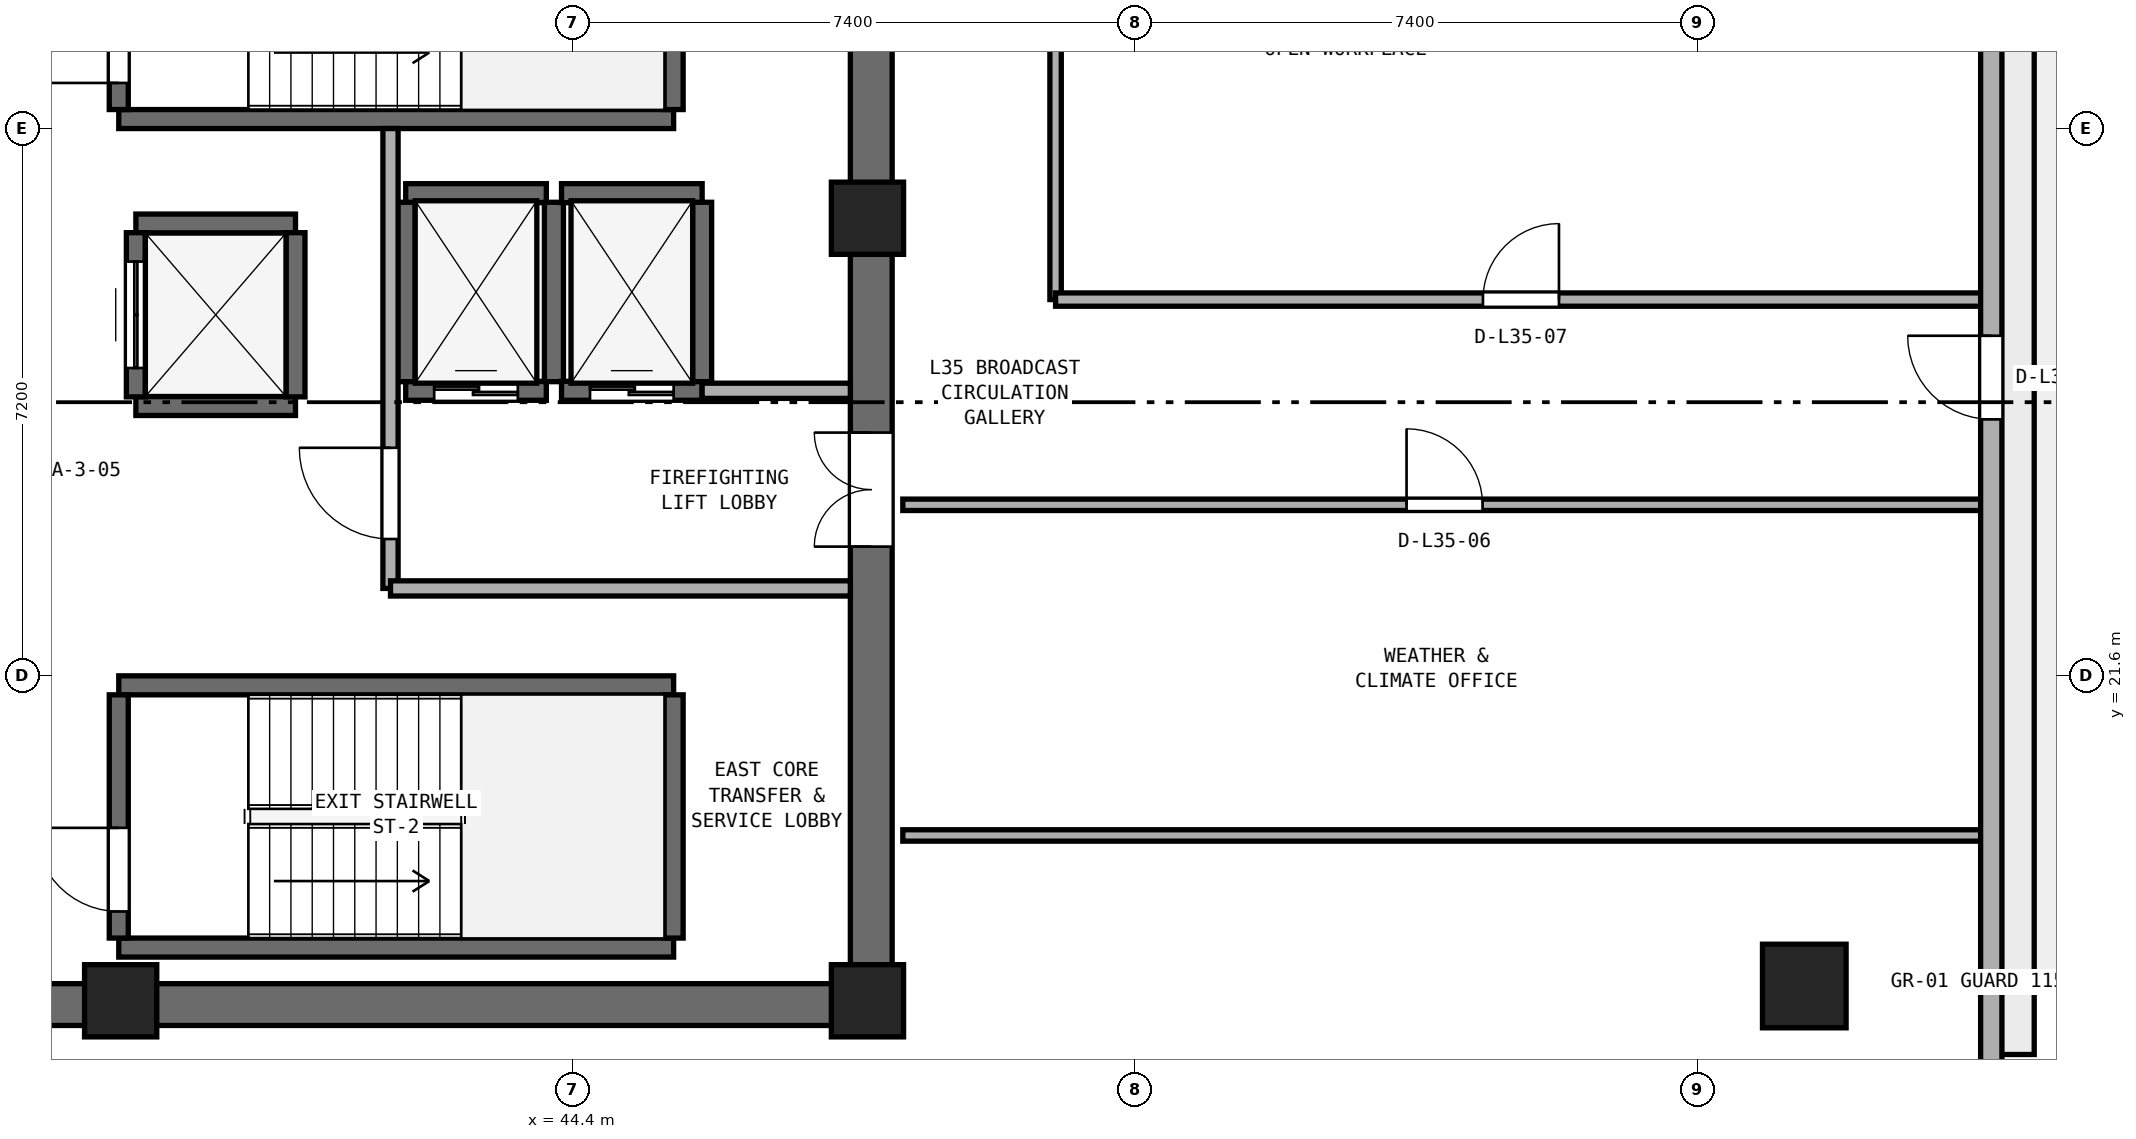
"""IFC4 building model, lengths in metres.
Left out: names, types, materials, properties, quantities, classifications, styles, units other than length and angle.
Written with IfcOpenShell. Run it as: python <this file> out.ifc"""

import sys

from ifc_helpers import new_model, si_unit, direction, frame, frame_2d, origin, origin_2d, place, context, subcontext, project, spatial, rectangle, extrude, element, fill, save


model = new_model("IFC4")
c1 = context("Model", 3, precision=1e-05, world=origin(), true_north=direction((0.0, 1.0)))
c2 = subcontext(c1, "Body", "Model", "MODEL_VIEW")
j1 = project(units=[si_unit("LENGTHUNIT", "METRE"), si_unit("PLANEANGLEUNIT", "RADIAN")], contexts=[c1])
p1 = place(None, origin())
s1 = spatial("IfcSite", under=j1, at=p1, CompositionType="ELEMENT")
p2 = place(p1, origin())
s2 = spatial("IfcBuilding", under=s1, at=p2, CompositionType="ELEMENT")
p3 = place(p2, frame((0.0, 0.0, 140.2)))
s3 = spatial("IfcBuildingStorey", under=s2, at=p3, CompositionType="ELEMENT", Elevation=140.2)
p4 = place(p3, frame((25.4, 17.275, 0.0), z_axis=(0.0, 0.0, 1.0), x_axis=(1.0, 0.0, 0.0)))
e1 = element("IfcWall", 1, at=p4, inside=s3, PredefinedType="SHEAR", context=c2, shape_type="SweptSolid", body=[
    extrude(rectangle(XDim=23.2, YDim=0.55, at=frame_2d((11.6, 0.0))), origin(), (0.0, 0.0, 1.0), 3.54),
])
p5 = place(p3, frame((48.325, 17.55, 0.0), z_axis=(0.0, 0.0, 1.0), x_axis=(0.0, 1.0, 0.0)))
e2 = element("IfcWall", 2, at=p5, inside=s3, PredefinedType="SHEAR", context=c2, shape_type="SweptSolid", body=[
    extrude(rectangle(XDim=15.3, YDim=0.55, at=frame_2d((7.65, 0.0))), origin(), (0.0, 0.0, 1.0), 3.54),
])
p6 = place(p5, frame((5.75, 0.0, 0.0)))
e3 = element("IfcOpeningElement", 3, at=p6, cuts=e2, PredefinedType="OPENING", context=c2, shape_type="SweptSolid", body=[
    extrude(rectangle(XDim=1.5, YDim=2.15, at=frame_2d((0.75, 1.075))), frame((0.0, 0.285, 0.0), z_axis=(0.0, -1.0, 0.0), x_axis=(1.0, 0.0, 0.0)), (0.0, 0.0, 1.0), 0.57),
])
for number, where, z_axis, x_axis in (
    (4, (38.45, 17.325, 0.0), (0.0, 0.0, 1.0), (1.0, 0.0, 0.0)),
    (5, (48.275, 17.325, 0.0), (0.0, 0.0, 1.0), (1.0, 0.0, 0.0)),
    (6, (48.275, 27.62, 0.0), (0.0, 0.0, 1.0), (1.0, 0.0, 0.0)),
):
    element("IfcColumn", number, at=place(p3, frame(where, z_axis=z_axis, x_axis=x_axis)), inside=s3, PredefinedType="PILASTER", context=c2, shape_type="SweptSolid", body=[
        extrude(rectangle(XDim=0.95, YDim=0.95, at=origin_2d()), origin(), (0.0, 0.0, 1.0), 3.8),
    ])
p7 = place(p3, frame((60.6, 17.519, 0.0), z_axis=(0.0, 0.0, 1.0), x_axis=(1.0, 0.0, 0.0)))
e7 = element("IfcColumn", 7, at=p7, inside=s3, PredefinedType="COLUMN", context=c2, shape_type="SweptSolid", body=[
    extrude(rectangle(XDim=1.1, YDim=1.1, at=origin_2d()), origin(), (0.0, 0.0, 1.0), 3.8),
])
p8 = place(p3, frame((38.425, 28.925, 0.0), z_axis=(0.0, 0.0, 1.0), x_axis=(1.0, 0.0, 0.0)))
e8 = element("IfcWall", 8, at=p8, inside=s3, PredefinedType="SHEAR", context=c2, shape_type="SweptSolid", body=[
    extrude(rectangle(XDim=7.3, YDim=0.25, at=frame_2d((3.65, 0.0))), origin(), (0.0, 0.0, 1.0), 3.54),
])
p9 = place(p3, frame((38.425, 29.05, 0.0), z_axis=(0.0, 0.0, 1.0), x_axis=(0.0, 1.0, 0.0)))
e9 = element("IfcWall", 9, at=p9, inside=s3, PredefinedType="SHEAR", context=c2, shape_type="SweptSolid", body=[
    extrude(rectangle(XDim=3.2, YDim=0.25, at=frame_2d((1.6, 0.0))), origin(), (0.0, 0.0, 1.0), 3.54),
])
p10 = place(p9, frame((0.35, 0.0, 0.0)))
e10 = element("IfcOpeningElement", 10, at=p10, cuts=e9, PredefinedType="OPENING", context=c2, shape_type="SweptSolid", body=[
    extrude(rectangle(XDim=1.1, YDim=2.15, at=frame_2d((0.55, 1.075))), frame((0.0, 0.135, 0.0), z_axis=(0.0, -1.0, 0.0), x_axis=(1.0, 0.0, 0.0)), (0.0, 0.0, 1.0), 0.27),
])
p11 = place(p3, frame((45.725, 29.05, 0.0), z_axis=(0.0, 0.0, 1.0), x_axis=(0.0, 1.0, 0.0)))
e11 = element("IfcWall", 11, at=p11, inside=s3, PredefinedType="SHEAR", context=c2, shape_type="SweptSolid", body=[
    extrude(rectangle(XDim=3.2, YDim=0.25, at=frame_2d((1.6, 0.0))), origin(), (0.0, 0.0, 1.0), 3.54),
])
for number, where, z_axis, x_axis in (
    (12, (38.425, 18.025, 0.0), (0.0, 0.0, 1.0), (1.0, 0.0, 0.0)),
    (13, (38.425, 21.475, 0.0), (0.0, 0.0, 1.0), (1.0, 0.0, 0.0)),
):
    element("IfcWall", number, at=place(p3, frame(where, z_axis=z_axis, x_axis=x_axis)), inside=s3, PredefinedType="SHEAR", context=c2, shape_type="SweptSolid", body=[
        extrude(rectangle(XDim=7.3, YDim=0.25, at=frame_2d((3.65, 0.0))), origin(), (0.0, 0.0, 1.0), 3.54),
    ])
p12 = place(p3, frame((38.425, 18.15, 0.0), z_axis=(0.0, 0.0, 1.0), x_axis=(0.0, 1.0, 0.0)))
e14 = element("IfcWall", 14, at=p12, inside=s3, PredefinedType="SHEAR", context=c2, shape_type="SweptSolid", body=[
    extrude(rectangle(XDim=3.2, YDim=0.25, at=frame_2d((1.6, 0.0))), origin(), (0.0, 0.0, 1.0), 3.54),
])
p13 = place(p12, frame((0.35, 0.0, 0.0)))
e15 = element("IfcOpeningElement", 15, at=p13, cuts=e14, PredefinedType="OPENING", context=c2, shape_type="SweptSolid", body=[
    extrude(rectangle(XDim=1.1, YDim=2.15, at=frame_2d((0.55, 1.075))), frame((0.0, 0.135, 0.0), z_axis=(0.0, -1.0, 0.0), x_axis=(1.0, 0.0, 0.0)), (0.0, 0.0, 1.0), 0.27),
])
p14 = place(p3, frame((45.725, 18.15, 0.0), z_axis=(0.0, 0.0, 1.0), x_axis=(0.0, 1.0, 0.0)))
e16 = element("IfcWall", 16, at=p14, inside=s3, PredefinedType="SHEAR", context=c2, shape_type="SweptSolid", body=[
    extrude(rectangle(XDim=3.2, YDim=0.25, at=frame_2d((1.6, 0.0))), origin(), (0.0, 0.0, 1.0), 3.54),
])
p15 = place(p3, frame((42.2, 25.35, 0.0), z_axis=(0.0, 0.0, 1.0), x_axis=(1.0, 0.0, 0.0)))
e17 = element("IfcWall", 17, at=p15, inside=s3, PredefinedType="SHEAR", context=c2, shape_type="SweptSolid", body=[
    extrude(rectangle(XDim=1.85, YDim=0.25, at=frame_2d((0.925, 0.0))), origin(), (0.0, 0.0, 1.0), 3.54),
])
p16 = place(p15, frame((0.375, 0.0, 0.0)))
e18 = element("IfcOpeningElement", 18, at=p16, cuts=e17, PredefinedType="OPENING", context=c2, shape_type="SweptSolid", body=[
    extrude(rectangle(XDim=1.1, YDim=2.15, at=frame_2d((0.55, 1.075))), frame((0.0, 0.135, 0.0), z_axis=(0.0, -1.0, 0.0), x_axis=(1.0, 0.0, 0.0)), (0.0, 0.0, 1.0), 0.27),
])
p17 = place(p3, frame((42.2, 27.95, 0.0), z_axis=(0.0, 0.0, 1.0), x_axis=(1.0, 0.0, 0.0)))
e19 = element("IfcWall", 19, at=p17, inside=s3, PredefinedType="SHEAR", context=c2, shape_type="SweptSolid", body=[
    extrude(rectangle(XDim=1.85, YDim=0.25, at=frame_2d((0.925, 0.0))), origin(), (0.0, 0.0, 1.0), 3.54),
])
for number, where, z_axis, x_axis in (
    (20, (42.2, 25.47, 0.0), (0.0, 0.0, 1.0), (0.0, 1.0, 0.0)),
    (21, (44.15, 25.47, 0.0), (0.0, 0.0, 1.0), (0.0, 1.0, 0.0)),
):
    element("IfcWall", number, at=place(p3, frame(where, z_axis=z_axis, x_axis=x_axis)), inside=s3, PredefinedType="SHEAR", context=c2, shape_type="SweptSolid", body=[
        extrude(rectangle(XDim=2.36, YDim=0.25, at=frame_2d((1.18, 0.0))), origin(), (0.0, 0.0, 1.0), 3.54),
    ])
p18 = place(p3, frame((44.25, 25.35, 0.0), z_axis=(0.0, 0.0, 1.0), x_axis=(1.0, 0.0, 0.0)))
e22 = element("IfcWall", 22, at=p18, inside=s3, PredefinedType="SHEAR", context=c2, shape_type="SweptSolid", body=[
    extrude(rectangle(XDim=1.85, YDim=0.25, at=frame_2d((0.925, 0.0))), origin(), (0.0, 0.0, 1.0), 3.54),
])
p19 = place(p18, frame((0.375, 0.0, 0.0)))
e23 = element("IfcOpeningElement", 23, at=p19, cuts=e22, PredefinedType="OPENING", context=c2, shape_type="SweptSolid", body=[
    extrude(rectangle(XDim=1.1, YDim=2.15, at=frame_2d((0.55, 1.075))), frame((0.0, 0.135, 0.0), z_axis=(0.0, -1.0, 0.0), x_axis=(1.0, 0.0, 0.0)), (0.0, 0.0, 1.0), 0.27),
])
p20 = place(p3, frame((44.25, 27.95, 0.0), z_axis=(0.0, 0.0, 1.0), x_axis=(1.0, 0.0, 0.0)))
e24 = element("IfcWall", 24, at=p20, inside=s3, PredefinedType="SHEAR", context=c2, shape_type="SweptSolid", body=[
    extrude(rectangle(XDim=1.85, YDim=0.25, at=frame_2d((0.925, 0.0))), origin(), (0.0, 0.0, 1.0), 3.54),
])
p21 = place(p3, frame((46.1, 25.47, 0.0), z_axis=(0.0, 0.0, 1.0), x_axis=(0.0, 1.0, 0.0)))
e25 = element("IfcWall", 25, at=p21, inside=s3, PredefinedType="SHEAR", context=c2, shape_type="SweptSolid", body=[
    extrude(rectangle(XDim=2.36, YDim=0.25, at=frame_2d((1.18, 0.0))), origin(), (0.0, 0.0, 1.0), 3.54),
])
for number, where, z_axis, x_axis in (
    (26, (38.65, 25.15, 0.0), (0.0, 0.0, 1.0), (1.0, 0.0, 0.0)),
    (27, (38.65, 27.55, 0.0), (0.0, 0.0, 1.0), (1.0, 0.0, 0.0)),
):
    element("IfcWall", number, at=place(p3, frame(where, z_axis=z_axis, x_axis=x_axis)), inside=s3, PredefinedType="SHEAR", context=c2, shape_type="SweptSolid", body=[
        extrude(rectangle(XDim=2.1, YDim=0.25, at=frame_2d((1.05, 0.0))), origin(), (0.0, 0.0, 1.0), 3.54),
    ])
p22 = place(p3, frame((38.65, 25.27, 0.0), z_axis=(0.0, 0.0, 1.0), x_axis=(0.0, 1.0, 0.0)))
e28 = element("IfcWall", 28, at=p22, inside=s3, PredefinedType="SHEAR", context=c2, shape_type="SweptSolid", body=[
    extrude(rectangle(XDim=2.16, YDim=0.25, at=frame_2d((1.08, 0.0))), origin(), (0.0, 0.0, 1.0), 3.54),
])
p23 = place(p22, frame((0.38, 0.0, 0.0)))
e29 = element("IfcOpeningElement", 29, at=p23, cuts=e28, PredefinedType="OPENING", context=c2, shape_type="SweptSolid", body=[
    extrude(rectangle(XDim=1.4, YDim=2.2, at=frame_2d((0.7, 1.1))), frame((0.0, 0.135, 0.0), z_axis=(0.0, -1.0, 0.0), x_axis=(1.0, 0.0, 0.0)), (0.0, 0.0, 1.0), 0.27),
])
p24 = place(p3, frame((40.75, 25.27, 0.0), z_axis=(0.0, 0.0, 1.0), x_axis=(0.0, 1.0, 0.0)))
e30 = element("IfcWall", 30, at=p24, inside=s3, PredefinedType="SHEAR", context=c2, shape_type="SweptSolid", body=[
    extrude(rectangle(XDim=2.16, YDim=0.25, at=frame_2d((1.08, 0.0))), origin(), (0.0, 0.0, 1.0), 3.54),
])
p25 = place(p3, frame((42.0, 22.75, 0.0), z_axis=(0.0, 0.0, 1.0), x_axis=(0.0, 1.0, 0.0)))
e31 = element("IfcWall", 31, at=p25, inside=s3, PredefinedType="SOLIDWALL", context=c2, shape_type="SweptSolid", body=[
    extrude(rectangle(XDim=6.05, YDim=0.2, at=frame_2d((3.025, 0.0))), origin(), (0.0, 0.0, 1.0), 3.54),
])
p26 = place(p25, frame((0.65, 0.0, 0.0)))
e32 = element("IfcOpeningElement", 32, at=p26, cuts=e31, PredefinedType="OPENING", context=c2, shape_type="SweptSolid", body=[
    extrude(rectangle(XDim=1.2, YDim=2.15, at=frame_2d((0.6, 1.075))), frame((0.0, 0.11, 0.0), z_axis=(0.0, -1.0, 0.0), x_axis=(1.0, 0.0, 0.0)), (0.0, 0.0, 1.0), 0.22),
])
p27 = place(p3, frame((42.0, 22.75, 0.0), z_axis=(0.0, 0.0, 1.0), x_axis=(1.0, 0.0, 0.0)))
e33 = element("IfcWall", 33, at=p27, inside=s3, PredefinedType="SOLIDWALL", context=c2, shape_type="SweptSolid", body=[
    extrude(rectangle(XDim=6.05, YDim=0.2, at=frame_2d((3.025, 0.0))), origin(), (0.0, 0.0, 1.0), 3.54),
])
p28 = place(p3, frame((46.1, 25.35, 0.0), z_axis=(0.0, 0.0, 1.0), x_axis=(1.0, 0.0, 0.0)))
e34 = element("IfcWall", 34, at=p28, inside=s3, PredefinedType="SOLIDWALL", context=c2, shape_type="SweptSolid", body=[
    extrude(rectangle(XDim=1.95, YDim=0.2, at=frame_2d((0.975, 0.0))), origin(), (0.0, 0.0, 1.0), 3.54),
])
p29 = place(p3, frame((50.75, 26.55, 0.0), z_axis=(0.0, 0.0, 1.0), x_axis=(0.0, 1.0, 0.0)))
e35 = element("IfcWall", 35, at=p29, inside=s3, PredefinedType="PARTITIONING", context=c2, shape_type="SweptSolid", body=[
    extrude(rectangle(XDim=9.0, YDim=0.15, at=frame_2d((4.5, 0.0))), origin(), (0.0, 0.0, 1.0), 3.54),
])
p30 = place(p3, frame((48.74, 19.5, 0.0), z_axis=(0.0, 0.0, 1.0), x_axis=(1.0, 0.0, 0.0)))
e36 = element("IfcWall", 36, at=p30, inside=s3, PredefinedType="PARTITIONING", context=c2, shape_type="SweptSolid", body=[
    extrude(rectangle(XDim=14.255, YDim=0.15, at=frame_2d((7.127, 0.0))), origin(), (0.0, 0.0, 1.0), 3.54),
])
p31 = place(p3, frame((48.74, 23.85, 0.0), z_axis=(0.0, 0.0, 1.0), x_axis=(1.0, 0.0, 0.0)))
e37 = element("IfcWall", 37, at=p31, inside=s3, PredefinedType="PARTITIONING", context=c2, shape_type="SweptSolid", body=[
    extrude(rectangle(XDim=14.255, YDim=0.15, at=frame_2d((7.127, 0.0))), origin(), (0.0, 0.0, 1.0), 3.54),
])
p32 = place(p31, frame((6.627, 0.0, 0.0)))
e38 = element("IfcOpeningElement", 38, at=p32, cuts=e37, PredefinedType="OPENING", context=c2, shape_type="SweptSolid", body=[
    extrude(rectangle(XDim=1.0, YDim=2.12, at=frame_2d((0.5, 1.06))), frame((0.0, 0.085, 0.0), z_axis=(0.0, -1.0, 0.0), x_axis=(1.0, 0.0, 0.0)), (0.0, 0.0, 1.0), 0.17),
])
p33 = place(p3, frame((50.75, 26.55, 0.0), z_axis=(0.0, 0.0, 1.0), x_axis=(1.0, 0.0, 0.0)))
e39 = element("IfcWall", 39, at=p33, inside=s3, PredefinedType="PARTITIONING", context=c2, shape_type="SweptSolid", body=[
    extrude(rectangle(XDim=12.245, YDim=0.175, at=frame_2d((6.123, 0.0))), origin(), (0.0, 0.0, 1.0), 3.54),
])
p34 = place(p33, frame((5.623, 0.0, 0.0)))
e40 = element("IfcOpeningElement", 40, at=p34, cuts=e39, PredefinedType="OPENING", context=c2, shape_type="SweptSolid", body=[
    extrude(rectangle(XDim=1.0, YDim=2.12, at=frame_2d((0.5, 1.06))), frame((0.0, 0.097, 0.0), z_axis=(0.0, -1.0, 0.0), x_axis=(1.0, 0.0, 0.0)), (0.0, 0.0, 1.0), 0.195),
])
p35 = place(p3, frame((63.06, 16.418, 0.0), z_axis=(0.0, 0.0, 1.0), x_axis=(0.0, 1.0, 0.0)))
e41 = element("IfcWall", 41, at=p35, inside=s3, PredefinedType="STANDARD", context=c2, shape_type="SweptSolid", body=[
    extrude(rectangle(XDim=18.812, YDim=0.28, at=frame_2d((9.406, 0.0))), origin(), (0.0, 0.0, 1.0), 3.54),
])
p36 = place(p35, frame((8.556, 0.0, 0.0)))
e42 = element("IfcOpeningElement", 42, at=p36, cuts=e41, PredefinedType="OPENING", context=c2, shape_type="SweptSolid", body=[
    extrude(rectangle(XDim=1.1, YDim=2.2, at=frame_2d((0.55, 1.1))), frame((0.0, 0.15, 0.0), z_axis=(0.0, -1.0, 0.0), x_axis=(1.0, 0.0, 0.0)), (0.0, 0.0, 1.0), 0.3),
])
p37 = place(p35, frame((14.143, 0.0, 0.9)))
e43 = element("IfcOpeningElement", 43, at=p37, cuts=e41, PredefinedType="OPENING", context=c2, shape_type="SweptSolid", body=[
    extrude(rectangle(XDim=2.4, YDim=1.75, at=frame_2d((1.2, 0.875))), frame((0.0, 0.15, 0.0), z_axis=(0.0, -1.0, 0.0), x_axis=(1.0, 0.0, 0.0)), (0.0, 0.0, 1.0), 0.3),
])
p38 = place(p10, origin())
e44 = element("IfcDoor", 44, at=p38, inside=s3, OperationType="SINGLE_SWING_LEFT", PredefinedType="DOOR", context=c2, shape_type="SweptSolid", body=[
    extrude(rectangle(XDim=1.1, YDim=2.15, at=frame_2d((0.55, 1.075))), frame((0.0, 0.025, 0.0), z_axis=(0.0, -1.0, 0.0), x_axis=(1.0, 0.0, 0.0)), (0.0, 0.0, 1.0), 0.05),
])
fill(e10, e44)
p39 = place(p13, origin())
e45 = element("IfcDoor", 45, at=p39, inside=s3, OperationType="SINGLE_SWING_RIGHT", PredefinedType="DOOR", context=c2, shape_type="SweptSolid", body=[
    extrude(rectangle(XDim=1.1, YDim=2.15, at=frame_2d((0.55, 1.075))), frame((0.0, 0.025, 0.0), z_axis=(0.0, -1.0, 0.0), x_axis=(1.0, 0.0, 0.0)), (0.0, 0.0, 1.0), 0.05),
])
fill(e15, e45)
p40 = place(p16, origin())
e46 = element("IfcDoor", 46, at=p40, inside=s3, OperationType="DOUBLE_DOOR_SLIDING", PredefinedType="DOOR", context=c2, shape_type="SweptSolid", body=[
    extrude(rectangle(XDim=1.1, YDim=2.15, at=frame_2d((0.55, 1.075))), frame((0.0, 0.025, 0.0), z_axis=(0.0, -1.0, 0.0), x_axis=(1.0, 0.0, 0.0)), (0.0, 0.0, 1.0), 0.05),
])
fill(e18, e46)
p41 = place(p19, origin())
e47 = element("IfcDoor", 47, at=p41, inside=s3, OperationType="DOUBLE_DOOR_SLIDING", PredefinedType="DOOR", context=c2, shape_type="SweptSolid", body=[
    extrude(rectangle(XDim=1.1, YDim=2.15, at=frame_2d((0.55, 1.075))), frame((0.0, 0.025, 0.0), z_axis=(0.0, -1.0, 0.0), x_axis=(1.0, 0.0, 0.0)), (0.0, 0.0, 1.0), 0.05),
])
fill(e23, e47)
p42 = place(p23, origin())
e48 = element("IfcDoor", 48, at=p42, inside=s3, OperationType="DOUBLE_DOOR_SLIDING", PredefinedType="DOOR", context=c2, shape_type="SweptSolid", body=[
    extrude(rectangle(XDim=1.4, YDim=2.2, at=frame_2d((0.7, 1.1))), frame((0.0, 0.025, 0.0), z_axis=(0.0, -1.0, 0.0), x_axis=(1.0, 0.0, 0.0)), (0.0, 0.0, 1.0), 0.05),
])
fill(e29, e48)
p43 = place(p26, origin())
e49 = element("IfcDoor", 49, at=p43, inside=s3, OperationType="SINGLE_SWING_RIGHT", PredefinedType="DOOR", context=c2, shape_type="SweptSolid", body=[
    extrude(rectangle(XDim=1.2, YDim=2.15, at=frame_2d((0.6, 1.075))), frame((0.0, 0.025, 0.0), z_axis=(0.0, -1.0, 0.0), x_axis=(1.0, 0.0, 0.0)), (0.0, 0.0, 1.0), 0.05),
])
fill(e32, e49)
p44 = place(p6, origin())
e50 = element("IfcDoor", 50, at=p44, inside=s3, OperationType="DOUBLE_DOOR_SINGLE_SWING", PredefinedType="DOOR", context=c2, shape_type="SweptSolid", body=[
    extrude(rectangle(XDim=1.5, YDim=2.15, at=frame_2d((0.75, 1.075))), frame((0.0, 0.025, 0.0), z_axis=(0.0, -1.0, 0.0), x_axis=(1.0, 0.0, 0.0)), (0.0, 0.0, 1.0), 0.05),
])
fill(e3, e50)
p45 = place(p32, origin())
e51 = element("IfcDoor", 51, at=p45, inside=s3, OperationType="SINGLE_SWING_LEFT", PredefinedType="DOOR", context=c2, shape_type="SweptSolid", body=[
    extrude(rectangle(XDim=1.0, YDim=2.12, at=frame_2d((0.5, 1.06))), frame((0.0, 0.025, 0.0), z_axis=(0.0, -1.0, 0.0), x_axis=(1.0, 0.0, 0.0)), (0.0, 0.0, 1.0), 0.05),
])
fill(e38, e51)
p46 = place(p34, origin())
e52 = element("IfcDoor", 52, at=p46, inside=s3, OperationType="SINGLE_SWING_RIGHT", PredefinedType="DOOR", context=c2, shape_type="SweptSolid", body=[
    extrude(rectangle(XDim=1.0, YDim=2.12, at=frame_2d((0.5, 1.06))), frame((0.0, 0.025, 0.0), z_axis=(0.0, -1.0, 0.0), x_axis=(1.0, 0.0, 0.0)), (0.0, 0.0, 1.0), 0.05),
])
fill(e40, e52)
p47 = place(p36, origin())
e53 = element("IfcDoor", 53, at=p47, inside=s3, OperationType="SINGLE_SWING_RIGHT", PredefinedType="DOOR", context=c2, shape_type="SweptSolid", body=[
    extrude(rectangle(XDim=1.1, YDim=2.2, at=frame_2d((0.55, 1.1))), frame((0.0, 0.025, 0.0), z_axis=(0.0, -1.0, 0.0), x_axis=(1.0, 0.0, 0.0)), (0.0, 0.0, 1.0), 0.05),
])
fill(e42, e53)
save(model, sys.argv[1])
